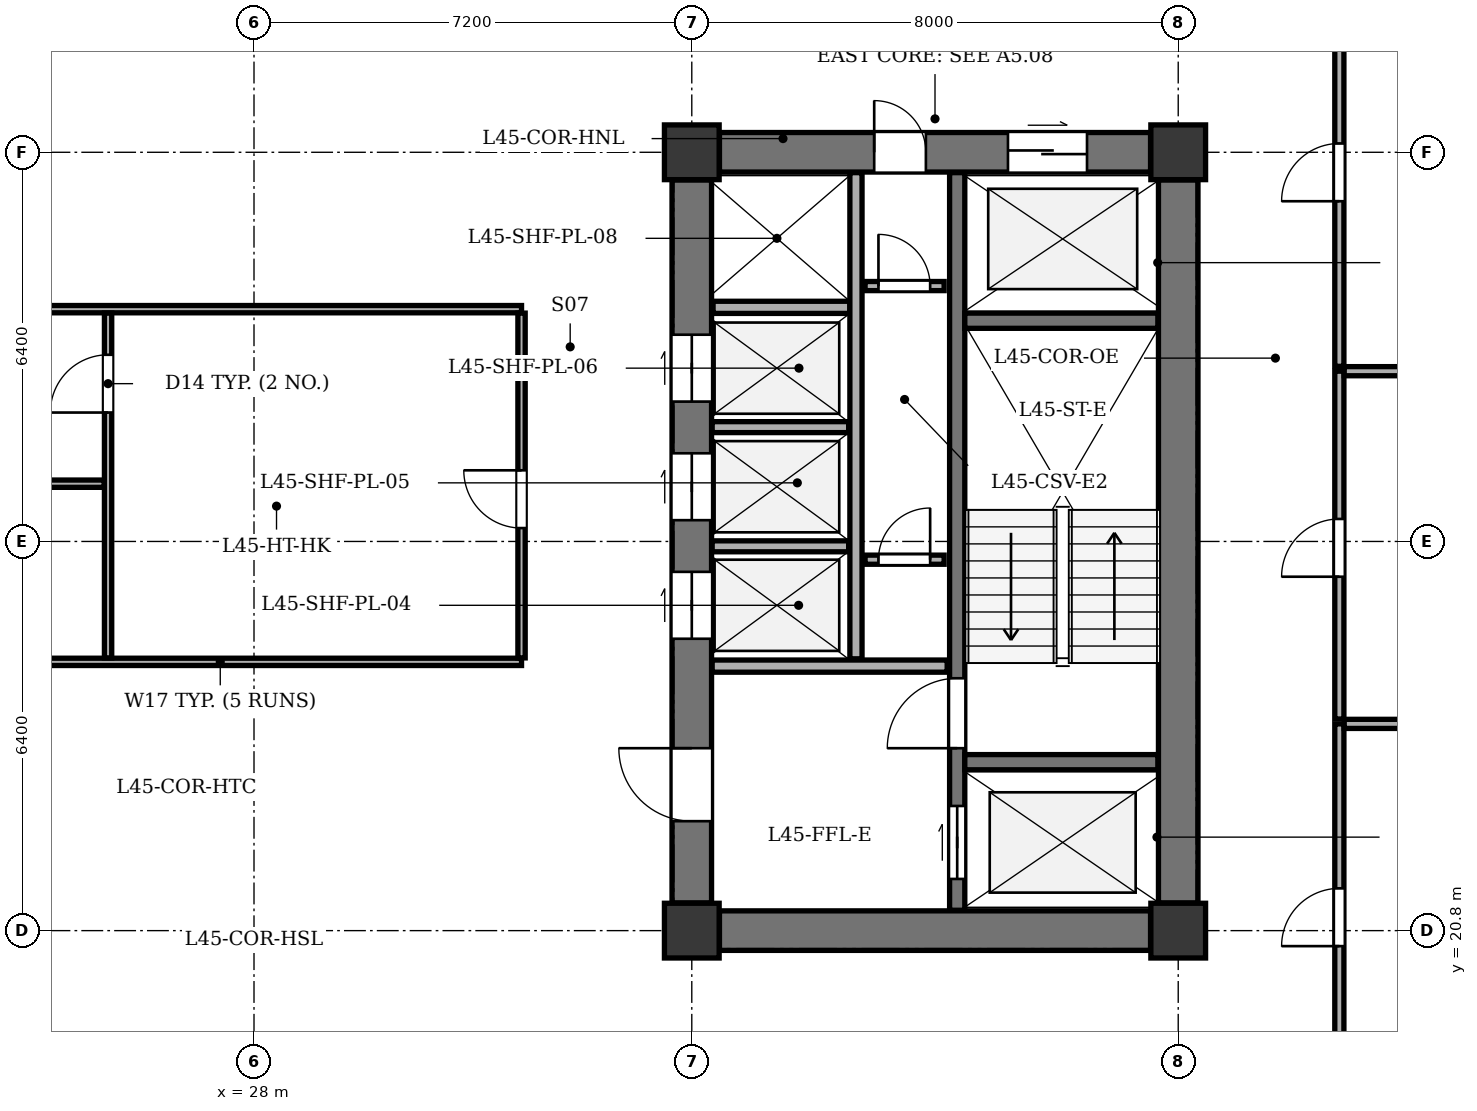
"""IFC4 building model, lengths in metres.
Left out: names, types, materials, properties, quantities, classifications, styles, units other than length and angle.
Written with IfcOpenShell. Run it as: python <this file> out.ifc"""

import sys

from ifc_helpers import new_model, si_unit, direction, frame, frame_2d, origin, origin_2d, place, context, subcontext, project, spatial, rectangle, extrude, element, fill, save


model = new_model("IFC4")
c1 = context("Model", 3, precision=1e-05, world=origin(), true_north=direction((0.0, 1.0)))
c2 = subcontext(c1, "Body", "Model", "MODEL_VIEW")
j1 = project(units=[si_unit("LENGTHUNIT", "METRE"), si_unit("PLANEANGLEUNIT", "RADIAN")], contexts=[c1])
p1 = place(None, origin())
s1 = spatial("IfcSite", under=j1, at=p1, CompositionType="ELEMENT")
p2 = place(p1, origin())
s2 = spatial("IfcBuilding", under=s1, at=p2, CompositionType="ELEMENT")
p3 = place(p2, frame((0.0, 0.0, 176.3)))
s3 = spatial("IfcBuildingStorey", under=s2, at=p3, CompositionType="ELEMENT", Elevation=176.3)
for number, where, z_axis, x_axis in (
    (1, (35.2, 20.8, 0.0), (0.0, 0.0, 1.0), (1.0, 0.0, 0.0)),
    (2, (43.2, 20.8, 0.0), (0.0, 0.0, 1.0), (1.0, 0.0, 0.0)),
    (3, (35.2, 33.6, 0.0), (0.0, 0.0, 1.0), (1.0, 0.0, 0.0)),
    (4, (43.2, 33.6, 0.0), (0.0, 0.0, 1.0), (1.0, 0.0, 0.0)),
):
    element("IfcColumn", number, at=place(p3, frame(where, z_axis=z_axis, x_axis=x_axis)), inside=s3, PredefinedType="COLUMN", context=c2, shape_type="SweptSolid", body=[
        extrude(rectangle(XDim=0.9, YDim=0.9, at=origin_2d()), origin(), (0.0, 0.0, 1.0), 3.5),
    ])
p4 = place(p3, frame((43.2, 21.255, 0.0), z_axis=(0.0, 0.0, 1.0), x_axis=(0.0, 1.0, 0.0)))
e5 = element("IfcWall", 5, at=p4, inside=s3, PredefinedType="SHEAR", context=c2, shape_type="SweptSolid", body=[
    extrude(rectangle(XDim=11.89, YDim=0.65, at=frame_2d((5.945, 0.0))), origin(), (0.0, 0.0, 1.0), 3.2),
])
p5 = place(p3, frame((35.655, 20.8, 0.0), z_axis=(0.0, 0.0, 1.0), x_axis=(1.0, 0.0, 0.0)))
e6 = element("IfcWall", 6, at=p5, inside=s3, PredefinedType="SHEAR", context=c2, shape_type="SweptSolid", body=[
    extrude(rectangle(XDim=7.09, YDim=0.65, at=frame_2d((3.545, 0.0))), origin(), (0.0, 0.0, 1.0), 3.2),
])
p6 = place(p3, frame((35.655, 33.6, 0.0), z_axis=(0.0, 0.0, 1.0), x_axis=(1.0, 0.0, 0.0)))
e7 = element("IfcWall", 7, at=p6, inside=s3, PredefinedType="SHEAR", context=c2, shape_type="SweptSolid", body=[
    extrude(rectangle(XDim=7.09, YDim=0.65, at=frame_2d((3.545, 0.0))), origin(), (0.0, 0.0, 1.0), 3.2),
])
p7 = place(p6, frame((4.745, 0.0, 0.0)))
e8 = element("IfcOpeningElement", 8, at=p7, cuts=e7, PredefinedType="OPENING", context=c2, shape_type="SweptSolid", body=[
    extrude(rectangle(XDim=1.3, YDim=2.15, at=frame_2d((0.65, 1.075))), frame((0.0, 0.335, 0.0), z_axis=(0.0, -1.0, 0.0), x_axis=(1.0, 0.0, 0.0)), (0.0, 0.0, 1.0), 0.67),
])
p8 = place(p6, frame((2.545, 0.0, 0.0)))
e9 = element("IfcOpeningElement", 9, at=p8, cuts=e7, PredefinedType="OPENING", context=c2, shape_type="SweptSolid", body=[
    extrude(rectangle(XDim=0.85, YDim=2.02, at=frame_2d((0.425, 1.01))), frame((0.0, 0.335, 0.0), z_axis=(0.0, -1.0, 0.0), x_axis=(1.0, 0.0, 0.0)), (0.0, 0.0, 1.0), 0.67),
])
p9 = place(p3, frame((35.2, 21.255, 0.0), z_axis=(0.0, 0.0, 1.0), x_axis=(0.0, 1.0, 0.0)))
e10 = element("IfcWall", 10, at=p9, inside=s3, PredefinedType="SHEAR", context=c2, shape_type="SweptSolid", body=[
    extrude(rectangle(XDim=11.89, YDim=0.65, at=frame_2d((5.945, 0.0))), origin(), (0.0, 0.0, 1.0), 3.2),
])
p10 = place(p9, frame((1.345, 0.0, 0.0)))
e11 = element("IfcOpeningElement", 11, at=p10, cuts=e10, PredefinedType="OPENING", context=c2, shape_type="SweptSolid", body=[
    extrude(rectangle(XDim=1.2, YDim=2.15, at=frame_2d((0.6, 1.075))), frame((0.0, 0.335, 0.0), z_axis=(0.0, -1.0, 0.0), x_axis=(1.0, 0.0, 0.0)), (0.0, 0.0, 1.0), 0.67),
])
p11 = place(p9, frame((4.345, 0.0, 0.0)))
e12 = element("IfcOpeningElement", 12, at=p11, cuts=e10, PredefinedType="OPENING", context=c2, shape_type="SweptSolid", body=[
    extrude(rectangle(XDim=1.1, YDim=2.1, at=frame_2d((0.55, 1.05))), frame((0.0, 0.335, 0.0), z_axis=(0.0, -1.0, 0.0), x_axis=(1.0, 0.0, 0.0)), (0.0, 0.0, 1.0), 0.67),
])
p12 = place(p9, frame((6.295, 0.0, 0.0)))
e13 = element("IfcOpeningElement", 13, at=p12, cuts=e10, PredefinedType="OPENING", context=c2, shape_type="SweptSolid", body=[
    extrude(rectangle(XDim=1.1, YDim=2.1, at=frame_2d((0.55, 1.05))), frame((0.0, 0.335, 0.0), z_axis=(0.0, -1.0, 0.0), x_axis=(1.0, 0.0, 0.0)), (0.0, 0.0, 1.0), 0.67),
])
p13 = place(p9, frame((8.245, 0.0, 0.0)))
e14 = element("IfcOpeningElement", 14, at=p13, cuts=e10, PredefinedType="OPENING", context=c2, shape_type="SweptSolid", body=[
    extrude(rectangle(XDim=1.1, YDim=2.1, at=frame_2d((0.55, 1.05))), frame((0.0, 0.335, 0.0), z_axis=(0.0, -1.0, 0.0), x_axis=(1.0, 0.0, 0.0)), (0.0, 0.0, 1.0), 0.67),
])
p14 = place(p3, frame((39.565, 21.135, 0.0), z_axis=(0.0, 0.0, 1.0), x_axis=(0.0, 1.0, 0.0)))
e15 = element("IfcWall", 15, at=p14, inside=s3, PredefinedType="SHEAR", context=c2, shape_type="SweptSolid", body=[
    extrude(rectangle(XDim=12.13, YDim=0.25, at=frame_2d((6.065, 0.0))), origin(), (0.0, 0.0, 1.0), 3.2),
])
p15 = place(p14, frame((0.515, 0.0, 0.0)))
e16 = element("IfcOpeningElement", 16, at=p15, cuts=e15, PredefinedType="OPENING", context=c2, shape_type="SweptSolid", body=[
    extrude(rectangle(XDim=1.2, YDim=2.15, at=frame_2d((0.6, 1.075))), frame((0.0, 0.135, 0.0), z_axis=(0.0, -1.0, 0.0), x_axis=(1.0, 0.0, 0.0)), (0.0, 0.0, 1.0), 0.27),
])
p16 = place(p14, frame((2.665, 0.0, 0.0)))
e17 = element("IfcOpeningElement", 17, at=p16, cuts=e15, PredefinedType="OPENING", context=c2, shape_type="SweptSolid", body=[
    extrude(rectangle(XDim=1.15, YDim=2.15, at=frame_2d((0.575, 1.075))), frame((0.0, 0.135, 0.0), z_axis=(0.0, -1.0, 0.0), x_axis=(1.0, 0.0, 0.0)), (0.0, 0.0, 1.0), 0.27),
])
for number, where, z_axis, x_axis in (
    (18, (39.69, 23.57, 0.0), (0.0, 0.0, 1.0), (1.0, 0.0, 0.0)),
    (19, (39.69, 30.83, 0.0), (0.0, 0.0, 1.0), (1.0, 0.0, 0.0)),
):
    element("IfcWall", number, at=place(p3, frame(where, z_axis=z_axis, x_axis=x_axis)), inside=s3, PredefinedType="SHEAR", context=c2, shape_type="SweptSolid", body=[
        extrude(rectangle(XDim=3.175, YDim=0.25, at=frame_2d((1.587, 0.0))), origin(), (0.0, 0.0, 1.0), 3.2),
    ])
p17 = place(p3, frame((35.535, 25.15, 0.0), z_axis=(0.0, 0.0, 1.0), x_axis=(1.0, 0.0, 0.0)))
e20 = element("IfcWall", 20, at=p17, inside=s3, PredefinedType="SOLIDWALL", context=c2, shape_type="SweptSolid", body=[
    extrude(rectangle(XDim=3.865, YDim=0.2, at=frame_2d((1.933, 0.0))), origin(), (0.0, 0.0, 1.0), 3.2),
])
p18 = place(p3, frame((35.55, 31.05, 0.0), z_axis=(0.0, 0.0, 1.0), x_axis=(1.0, 0.0, 0.0)))
e21 = element("IfcWall", 21, at=p18, inside=s3, PredefinedType="SOLIDWALL", context=c2, shape_type="SweptSolid", body=[
    extrude(rectangle(XDim=2.25, YDim=0.2, at=frame_2d((1.125, 0.0))), origin(), (0.0, 0.0, 1.0), 3.2),
])
p19 = place(p3, frame((37.9, 25.27, 0.0), z_axis=(0.0, 0.0, 1.0), x_axis=(0.0, 1.0, 0.0)))
e22 = element("IfcWall", 22, at=p19, inside=s3, PredefinedType="SOLIDWALL", context=c2, shape_type="SweptSolid", body=[
    extrude(rectangle(XDim=7.995, YDim=0.2, at=frame_2d((3.998, 0.0))), origin(), (0.0, 0.0, 1.0), 3.2),
])
for number, where, z_axis, x_axis in (
    (23, (35.535, 27.12, 0.0), (0.0, 0.0, 1.0), (1.0, 0.0, 0.0)),
    (24, (35.535, 29.08, 0.0), (0.0, 0.0, 1.0), (1.0, 0.0, 0.0)),
):
    element("IfcWall", number, at=place(p3, frame(where, z_axis=z_axis, x_axis=x_axis)), inside=s3, PredefinedType="PARTITIONING", context=c2, shape_type="SweptSolid", body=[
        extrude(rectangle(XDim=2.245, YDim=0.18, at=frame_2d((1.123, 0.0))), origin(), (0.0, 0.0, 1.0), 3.2),
    ])
p20 = place(p3, frame((38.05, 26.9, 0.0), z_axis=(0.0, 0.0, 1.0), x_axis=(1.0, 0.0, 0.0)))
e25 = element("IfcWall", 25, at=p20, inside=s3, PredefinedType="PARTITIONING", context=c2, shape_type="SweptSolid", body=[
    extrude(rectangle(XDim=1.3, YDim=0.15, at=frame_2d((0.65, 0.0))), origin(), (0.0, 0.0, 1.0), 3.2),
])
p21 = place(p20, frame((0.22, 0.0, 0.0)))
e26 = element("IfcOpeningElement", 26, at=p21, cuts=e25, PredefinedType="OPENING", context=c2, shape_type="SweptSolid", body=[
    extrude(rectangle(XDim=0.85, YDim=2.02, at=frame_2d((0.425, 1.01))), frame((0.0, 0.085, 0.0), z_axis=(0.0, -1.0, 0.0), x_axis=(1.0, 0.0, 0.0)), (0.0, 0.0, 1.0), 0.17),
])
p22 = place(p3, frame((38.05, 31.4, 0.0), z_axis=(0.0, 0.0, 1.0), x_axis=(1.0, 0.0, 0.0)))
e27 = element("IfcWall", 27, at=p22, inside=s3, PredefinedType="PARTITIONING", context=c2, shape_type="SweptSolid", body=[
    extrude(rectangle(XDim=1.3, YDim=0.15, at=frame_2d((0.65, 0.0))), origin(), (0.0, 0.0, 1.0), 3.2),
])
p23 = place(p22, frame((0.22, 0.0, 0.0)))
e28 = element("IfcOpeningElement", 28, at=p23, cuts=e27, PredefinedType="OPENING", context=c2, shape_type="SweptSolid", body=[
    extrude(rectangle(XDim=0.85, YDim=2.02, at=frame_2d((0.425, 1.01))), frame((0.0, 0.085, 0.0), z_axis=(0.0, -1.0, 0.0), x_axis=(1.0, 0.0, 0.0)), (0.0, 0.0, 1.0), 0.17),
])
p24 = place(p3, frame((20.46, 25.22, 0.0), z_axis=(0.0, 0.0, 1.0), x_axis=(1.0, 0.0, 0.0)))
e29 = element("IfcWall", 29, at=p24, inside=s3, PredefinedType="PARTITIONING", context=c2, shape_type="SweptSolid", body=[
    extrude(rectangle(XDim=11.94, YDim=0.12, at=frame_2d((5.97, 0.0))), origin(), (0.0, 0.0, 1.0), 3.2),
])
p25 = place(p24, frame((0.68, 0.0, 0.0)))
e30 = element("IfcOpeningElement", 30, at=p25, cuts=e29, PredefinedType="OPENING", context=c2, shape_type="SweptSolid", body=[
    extrude(rectangle(XDim=1.0, YDim=2.1, at=frame_2d((0.5, 1.05))), frame((0.0, 0.07, 0.0), z_axis=(0.0, -1.0, 0.0), x_axis=(1.0, 0.0, 0.0)), (0.0, 0.0, 1.0), 0.14),
])
p26 = place(p3, frame((20.46, 31.02, 0.0), z_axis=(0.0, 0.0, 1.0), x_axis=(1.0, 0.0, 0.0)))
e31 = element("IfcWall", 31, at=p26, inside=s3, PredefinedType="PARTITIONING", context=c2, shape_type="SweptSolid", body=[
    extrude(rectangle(XDim=11.94, YDim=0.12, at=frame_2d((5.97, 0.0))), origin(), (0.0, 0.0, 1.0), 3.2),
])
p27 = place(p3, frame((32.4, 25.285, 0.0), z_axis=(0.0, 0.0, 1.0), x_axis=(0.0, 1.0, 0.0)))
e32 = element("IfcWall", 32, at=p27, inside=s3, PredefinedType="PARTITIONING", context=c2, shape_type="SweptSolid", body=[
    extrude(rectangle(XDim=5.67, YDim=0.12, at=frame_2d((2.835, 0.0))), origin(), (0.0, 0.0, 1.0), 3.2),
])
p28 = place(p27, frame((2.135, 0.0, 0.0)))
e33 = element("IfcOpeningElement", 33, at=p28, cuts=e32, PredefinedType="OPENING", context=c2, shape_type="SweptSolid", body=[
    extrude(rectangle(XDim=0.95, YDim=2.1, at=frame_2d((0.475, 1.05))), frame((0.0, 0.07, 0.0), z_axis=(0.0, -1.0, 0.0), x_axis=(1.0, 0.0, 0.0)), (0.0, 0.0, 1.0), 0.14),
])
p29 = place(p3, frame((25.6, 25.285, 0.0), z_axis=(0.0, 0.0, 1.0), x_axis=(0.0, 1.0, 0.0)))
e34 = element("IfcWall", 34, at=p29, inside=s3, PredefinedType="PARTITIONING", context=c2, shape_type="SweptSolid", body=[
    extrude(rectangle(XDim=5.67, YDim=0.12, at=frame_2d((2.835, 0.0))), origin(), (0.0, 0.0, 1.0), 3.2),
])
p30 = place(p29, frame((4.035, 0.0, 0.0)))
e35 = element("IfcOpeningElement", 35, at=p30, cuts=e34, PredefinedType="OPENING", context=c2, shape_type="SweptSolid", body=[
    extrude(rectangle(XDim=0.95, YDim=2.1, at=frame_2d((0.475, 1.05))), frame((0.0, 0.07, 0.0), z_axis=(0.0, -1.0, 0.0), x_axis=(1.0, 0.0, 0.0)), (0.0, 0.0, 1.0), 0.14),
])
p31 = place(p3, frame((16.65, 28.15, 0.0), z_axis=(0.0, 0.0, 1.0), x_axis=(1.0, 0.0, 0.0)))
e36 = element("IfcWall", 36, at=p31, inside=s3, PredefinedType="PARTITIONING", context=c2, shape_type="SweptSolid", body=[
    extrude(rectangle(XDim=8.885, YDim=0.12, at=frame_2d((4.442, 0.0))), origin(), (0.0, 0.0, 1.0), 3.2),
])
p32 = place(p3, frame((45.85, 17.93, 0.0), z_axis=(0.0, 0.0, 1.0), x_axis=(0.0, 1.0, 0.0)))
e37 = element("IfcWall", 37, at=p32, inside=s3, PredefinedType="PARTITIONING", context=c2, shape_type="SweptSolid", body=[
    extrude(rectangle(XDim=6.27, YDim=0.15, at=frame_2d((3.135, 0.0))), origin(), (0.0, 0.0, 1.0), 3.2),
])
p33 = place(p32, frame((2.615, 0.0, 0.0)))
e38 = element("IfcOpeningElement", 38, at=p33, cuts=e37, PredefinedType="OPENING", context=c2, shape_type="SweptSolid", body=[
    extrude(rectangle(XDim=0.95, YDim=2.1, at=frame_2d((0.475, 1.05))), frame((0.0, 0.085, 0.0), z_axis=(0.0, -1.0, 0.0), x_axis=(1.0, 0.0, 0.0)), (0.0, 0.0, 1.0), 0.17),
])
p34 = place(p3, frame((45.93, 24.2, 0.0), z_axis=(0.0, 0.0, 1.0), x_axis=(1.0, 0.0, 0.0)))
e39 = element("IfcWall", 39, at=p34, inside=s3, PredefinedType="PARTITIONING", context=c2, shape_type="SweptSolid", body=[
    extrude(rectangle(XDim=9.395, YDim=0.15, at=frame_2d((4.698, 0.0))), origin(), (0.0, 0.0, 1.0), 3.2),
])
p35 = place(p3, frame((45.85, 24.28, 0.0), z_axis=(0.0, 0.0, 1.0), x_axis=(0.0, 1.0, 0.0)))
e40 = element("IfcWall", 40, at=p35, inside=s3, PredefinedType="PARTITIONING", context=c2, shape_type="SweptSolid", body=[
    extrude(rectangle(XDim=5.72, YDim=0.15, at=frame_2d((2.86, 0.0))), origin(), (0.0, 0.0, 1.0), 3.2),
])
p36 = place(p35, frame((2.34, 0.0, 0.0)))
e41 = element("IfcOpeningElement", 41, at=p36, cuts=e40, PredefinedType="OPENING", context=c2, shape_type="SweptSolid", body=[
    extrude(rectangle(XDim=0.95, YDim=2.1, at=frame_2d((0.475, 1.05))), frame((0.0, 0.085, 0.0), z_axis=(0.0, -1.0, 0.0), x_axis=(1.0, 0.0, 0.0)), (0.0, 0.0, 1.0), 0.17),
])
p37 = place(p3, frame((45.93, 30.0, 0.0), z_axis=(0.0, 0.0, 1.0), x_axis=(1.0, 0.0, 0.0)))
e42 = element("IfcWall", 42, at=p37, inside=s3, PredefinedType="PARTITIONING", context=c2, shape_type="SweptSolid", body=[
    extrude(rectangle(XDim=9.395, YDim=0.15, at=frame_2d((4.698, 0.0))), origin(), (0.0, 0.0, 1.0), 3.2),
])
p38 = place(p3, frame((45.85, 30.08, 0.0), z_axis=(0.0, 0.0, 1.0), x_axis=(0.0, 1.0, 0.0)))
e43 = element("IfcWall", 43, at=p38, inside=s3, PredefinedType="PARTITIONING", context=c2, shape_type="SweptSolid", body=[
    extrude(rectangle(XDim=6.39, YDim=0.15, at=frame_2d((3.195, 0.0))), origin(), (0.0, 0.0, 1.0), 3.2),
])
p39 = place(p38, frame((2.715, 0.0, 0.0)))
e44 = element("IfcOpeningElement", 44, at=p39, cuts=e43, PredefinedType="OPENING", context=c2, shape_type="SweptSolid", body=[
    extrude(rectangle(XDim=0.95, YDim=2.1, at=frame_2d((0.475, 1.05))), frame((0.0, 0.085, 0.0), z_axis=(0.0, -1.0, 0.0), x_axis=(1.0, 0.0, 0.0)), (0.0, 0.0, 1.0), 0.17),
])
p40 = place(p7, origin())
e45 = element("IfcDoor", 45, at=p40, inside=s3, OperationType="DOUBLE_DOOR_SLIDING", PredefinedType="DOOR", context=c2, shape_type="SweptSolid", body=[
    extrude(rectangle(XDim=1.3, YDim=2.15, at=frame_2d((0.65, 1.075))), frame((0.0, 0.025, 0.0), z_axis=(0.0, -1.0, 0.0), x_axis=(1.0, 0.0, 0.0)), (0.0, 0.0, 1.0), 0.05),
])
fill(e8, e45)
p41 = place(p8, origin())
e46 = element("IfcDoor", 46, at=p41, inside=s3, OperationType="SINGLE_SWING_LEFT", PredefinedType="DOOR", context=c2, shape_type="SweptSolid", body=[
    extrude(rectangle(XDim=0.85, YDim=2.02, at=frame_2d((0.425, 1.01))), frame((0.0, 0.025, 0.0), z_axis=(0.0, -1.0, 0.0), x_axis=(1.0, 0.0, 0.0)), (0.0, 0.0, 1.0), 0.05),
])
fill(e9, e46)
p42 = place(p10, origin())
e47 = element("IfcDoor", 47, at=p42, inside=s3, OperationType="SINGLE_SWING_RIGHT", PredefinedType="DOOR", context=c2, shape_type="SweptSolid", body=[
    extrude(rectangle(XDim=1.2, YDim=2.15, at=frame_2d((0.6, 1.075))), frame((0.0, 0.025, 0.0), z_axis=(0.0, -1.0, 0.0), x_axis=(1.0, 0.0, 0.0)), (0.0, 0.0, 1.0), 0.05),
])
fill(e11, e47)
p43 = place(p11, origin())
e48 = element("IfcDoor", 48, at=p43, inside=s3, OperationType="DOUBLE_DOOR_SLIDING", PredefinedType="DOOR", context=c2, shape_type="SweptSolid", body=[
    extrude(rectangle(XDim=1.1, YDim=2.1, at=frame_2d((0.55, 1.05))), frame((0.0, 0.025, 0.0), z_axis=(0.0, -1.0, 0.0), x_axis=(1.0, 0.0, 0.0)), (0.0, 0.0, 1.0), 0.05),
])
fill(e12, e48)
p44 = place(p12, origin())
e49 = element("IfcDoor", 49, at=p44, inside=s3, OperationType="DOUBLE_DOOR_SLIDING", PredefinedType="DOOR", context=c2, shape_type="SweptSolid", body=[
    extrude(rectangle(XDim=1.1, YDim=2.1, at=frame_2d((0.55, 1.05))), frame((0.0, 0.025, 0.0), z_axis=(0.0, -1.0, 0.0), x_axis=(1.0, 0.0, 0.0)), (0.0, 0.0, 1.0), 0.05),
])
fill(e13, e49)
p45 = place(p13, origin())
e50 = element("IfcDoor", 50, at=p45, inside=s3, OperationType="DOUBLE_DOOR_SLIDING", PredefinedType="DOOR", context=c2, shape_type="SweptSolid", body=[
    extrude(rectangle(XDim=1.1, YDim=2.1, at=frame_2d((0.55, 1.05))), frame((0.0, 0.025, 0.0), z_axis=(0.0, -1.0, 0.0), x_axis=(1.0, 0.0, 0.0)), (0.0, 0.0, 1.0), 0.05),
])
fill(e14, e50)
p46 = place(p15, origin())
e51 = element("IfcDoor", 51, at=p46, inside=s3, OperationType="DOUBLE_DOOR_SLIDING", PredefinedType="DOOR", context=c2, shape_type="SweptSolid", body=[
    extrude(rectangle(XDim=1.2, YDim=2.15, at=frame_2d((0.6, 1.075))), frame((0.0, 0.025, 0.0), z_axis=(0.0, -1.0, 0.0), x_axis=(1.0, 0.0, 0.0)), (0.0, 0.0, 1.0), 0.05),
])
fill(e16, e51)
p47 = place(p16, origin())
e52 = element("IfcDoor", 52, at=p47, inside=s3, OperationType="SINGLE_SWING_LEFT", PredefinedType="DOOR", context=c2, shape_type="SweptSolid", body=[
    extrude(rectangle(XDim=1.15, YDim=2.15, at=frame_2d((0.575, 1.075))), frame((0.0, 0.025, 0.0), z_axis=(0.0, -1.0, 0.0), x_axis=(1.0, 0.0, 0.0)), (0.0, 0.0, 1.0), 0.05),
])
fill(e17, e52)
p48 = place(p21, origin())
e53 = element("IfcDoor", 53, at=p48, inside=s3, OperationType="SINGLE_SWING_RIGHT", PredefinedType="DOOR", context=c2, shape_type="SweptSolid", body=[
    extrude(rectangle(XDim=0.85, YDim=2.02, at=frame_2d((0.425, 1.01))), frame((0.0, 0.025, 0.0), z_axis=(0.0, -1.0, 0.0), x_axis=(1.0, 0.0, 0.0)), (0.0, 0.0, 1.0), 0.05),
])
fill(e26, e53)
p49 = place(p23, origin())
e54 = element("IfcDoor", 54, at=p49, inside=s3, OperationType="SINGLE_SWING_LEFT", PredefinedType="DOOR", context=c2, shape_type="SweptSolid", body=[
    extrude(rectangle(XDim=0.85, YDim=2.02, at=frame_2d((0.425, 1.01))), frame((0.0, 0.025, 0.0), z_axis=(0.0, -1.0, 0.0), x_axis=(1.0, 0.0, 0.0)), (0.0, 0.0, 1.0), 0.05),
])
fill(e28, e54)
p50 = place(p30, origin())
e55 = element("IfcDoor", 55, at=p50, inside=s3, OperationType="SINGLE_SWING_LEFT", PredefinedType="DOOR", context=c2, shape_type="SweptSolid", body=[
    extrude(rectangle(XDim=0.95, YDim=2.1, at=frame_2d((0.475, 1.05))), frame((0.0, 0.025, 0.0), z_axis=(0.0, -1.0, 0.0), x_axis=(1.0, 0.0, 0.0)), (0.0, 0.0, 1.0), 0.05),
])
fill(e35, e55)
p51 = place(p28, origin())
e56 = element("IfcDoor", 56, at=p51, inside=s3, OperationType="SINGLE_SWING_RIGHT", PredefinedType="DOOR", context=c2, shape_type="SweptSolid", body=[
    extrude(rectangle(XDim=0.95, YDim=2.1, at=frame_2d((0.475, 1.05))), frame((0.0, 0.025, 0.0), z_axis=(0.0, -1.0, 0.0), x_axis=(1.0, 0.0, 0.0)), (0.0, 0.0, 1.0), 0.05),
])
fill(e33, e56)
p52 = place(p33, origin())
e57 = element("IfcDoor", 57, at=p52, inside=s3, OperationType="SINGLE_SWING_LEFT", PredefinedType="DOOR", context=c2, shape_type="SweptSolid", body=[
    extrude(rectangle(XDim=0.95, YDim=2.1, at=frame_2d((0.475, 1.05))), frame((0.0, 0.025, 0.0), z_axis=(0.0, -1.0, 0.0), x_axis=(1.0, 0.0, 0.0)), (0.0, 0.0, 1.0), 0.05),
])
fill(e38, e57)
p53 = place(p36, origin())
e58 = element("IfcDoor", 58, at=p53, inside=s3, OperationType="SINGLE_SWING_LEFT", PredefinedType="DOOR", context=c2, shape_type="SweptSolid", body=[
    extrude(rectangle(XDim=0.95, YDim=2.1, at=frame_2d((0.475, 1.05))), frame((0.0, 0.025, 0.0), z_axis=(0.0, -1.0, 0.0), x_axis=(1.0, 0.0, 0.0)), (0.0, 0.0, 1.0), 0.05),
])
fill(e41, e58)
p54 = place(p39, origin())
e59 = element("IfcDoor", 59, at=p54, inside=s3, OperationType="SINGLE_SWING_LEFT", PredefinedType="DOOR", context=c2, shape_type="SweptSolid", body=[
    extrude(rectangle(XDim=0.95, YDim=2.1, at=frame_2d((0.475, 1.05))), frame((0.0, 0.025, 0.0), z_axis=(0.0, -1.0, 0.0), x_axis=(1.0, 0.0, 0.0)), (0.0, 0.0, 1.0), 0.05),
])
fill(e44, e59)
save(model, sys.argv[1])
